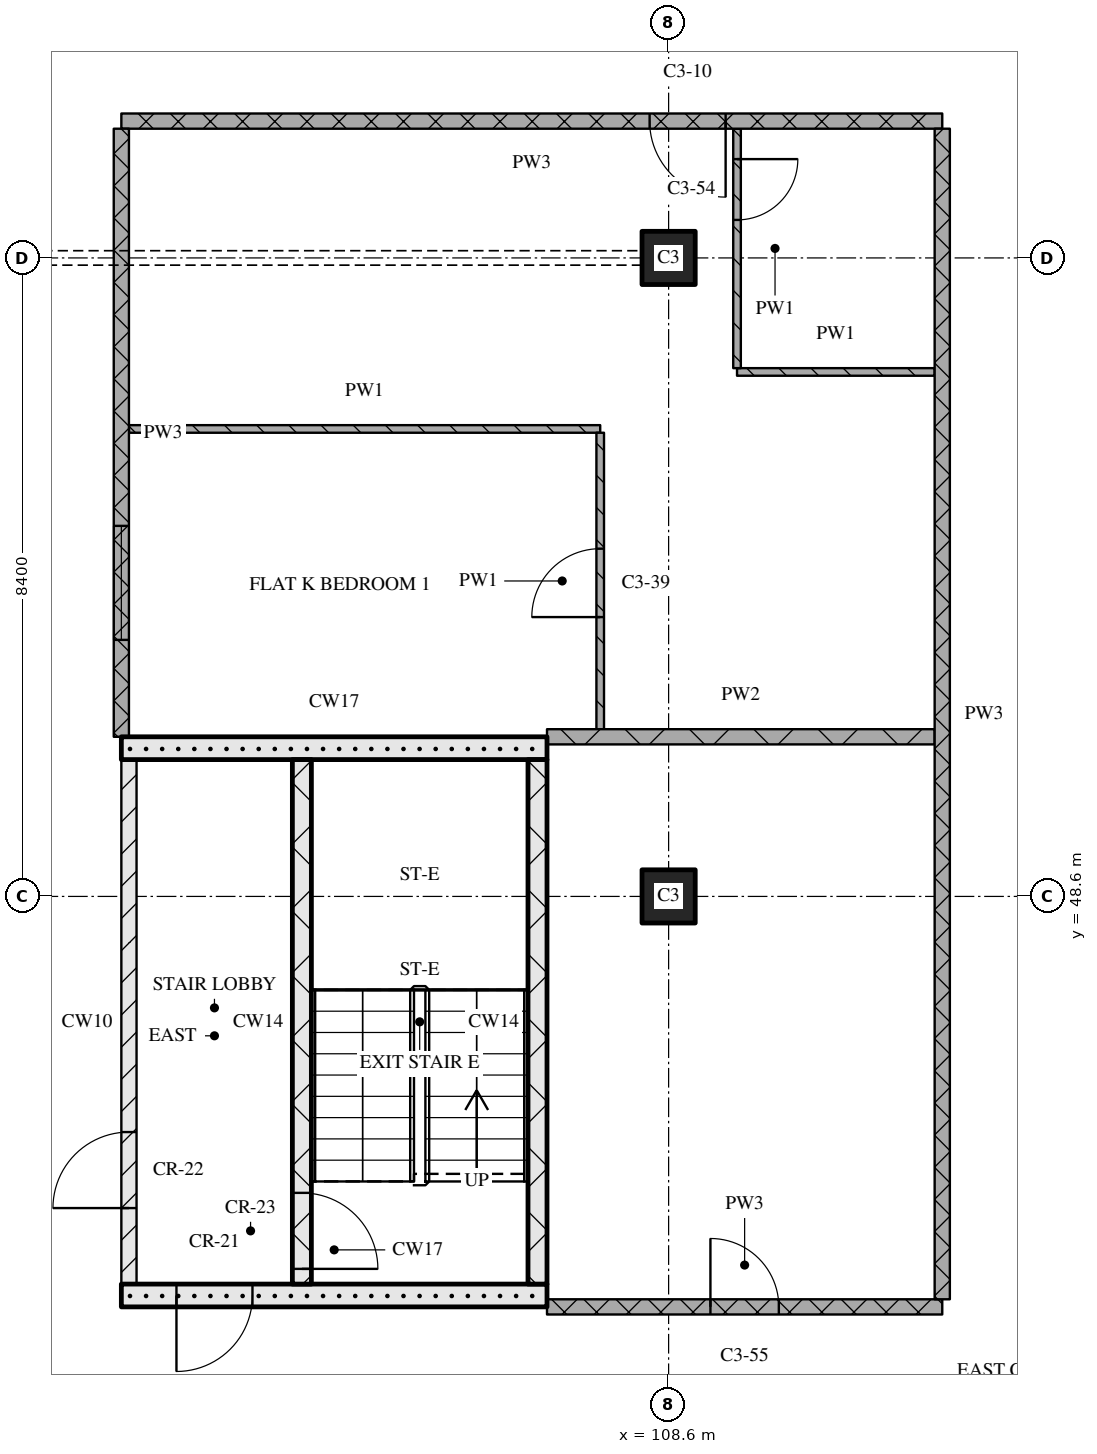
"""IFC4 building model, lengths in metres.
Left out: names, types, materials, properties, quantities, classifications, styles, units other than length and angle.
Written with IfcOpenShell. Run it as: python <this file> out.ifc"""

import sys

from ifc_helpers import new_model, si_unit, direction, frame, frame_2d, origin, origin_2d, place, context, subcontext, project, spatial, rectangle, extrude, element, fill, save


model = new_model("IFC4")
c1 = context("Model", 3, precision=1e-05, world=origin(), true_north=direction((0.0, 1.0)))
c2 = subcontext(c1, "Body", "Model", "MODEL_VIEW")
j1 = project(units=[si_unit("LENGTHUNIT", "METRE"), si_unit("PLANEANGLEUNIT", "RADIAN")], contexts=[c1])
p1 = place(None, origin())
s1 = spatial("IfcSite", under=j1, at=p1, CompositionType="ELEMENT")
p2 = place(p1, origin())
s2 = spatial("IfcBuilding", under=s1, at=p2, CompositionType="ELEMENT")
p3 = place(p2, frame((0.0, 0.0, 176.25)))
s3 = spatial("IfcBuildingStorey", under=s2, at=p3, CompositionType="ELEMENT", Elevation=176.25)
for number, where, z_axis, x_axis in (
    (1, (108.6, 48.6, 0.0), (0.0, 0.0, 1.0), (1.0, 0.0, 0.0)),
    (2, (108.6, 57.0, 0.0), (0.0, 0.0, 1.0), (1.0, 0.0, 0.0)),
):
    element("IfcColumn", number, at=place(p3, frame(where, z_axis=z_axis, x_axis=x_axis)), inside=s3, PredefinedType="COLUMN", context=c2, shape_type="SweptSolid", body=[
        extrude(rectangle(XDim=0.7, YDim=0.7, at=origin_2d()), origin(), (0.0, 0.0, 1.0), 3.6),
    ])
p4 = place(p3, frame((101.4, 43.35, 0.0), z_axis=(0.0, 0.0, 1.0), x_axis=(1.0, 0.0, 0.0)))
e3 = element("IfcWall", 3, at=p4, inside=s3, PredefinedType="SOLIDWALL", context=c2, shape_type="SweptSolid", body=[
    extrude(rectangle(XDim=5.6, YDim=0.3, at=frame_2d((2.8, 0.0))), origin(), (0.0, 0.0, 1.0), 3.32),
])
p5 = place(p4, frame((0.725, 0.0, 0.0)))
e4 = element("IfcOpeningElement", 4, at=p5, cuts=e3, PredefinedType="OPENING", context=c2, shape_type="SweptSolid", body=[
    extrude(rectangle(XDim=1.0, YDim=2.1, at=frame_2d((0.5, 1.05))), frame((0.0, 0.16, 0.0), z_axis=(0.0, -1.0, 0.0), x_axis=(1.0, 0.0, 0.0)), (0.0, 0.0, 1.0), 0.32),
])
p6 = place(p3, frame((101.5, 43.5, 0.0), z_axis=(0.0, 0.0, 1.0), x_axis=(0.0, 1.0, 0.0)))
e5 = element("IfcWall", 5, at=p6, inside=s3, PredefinedType="PARTITIONING", context=c2, shape_type="SweptSolid", body=[
    extrude(rectangle(XDim=6.9, YDim=0.2, at=frame_2d((3.45, 0.0))), origin(), (0.0, 0.0, 1.0), 3.32),
])
p7 = place(p6, frame((1.0, 0.0, 0.0)))
e6 = element("IfcOpeningElement", 6, at=p7, cuts=e5, PredefinedType="OPENING", context=c2, shape_type="SweptSolid", body=[
    extrude(rectangle(XDim=1.0, YDim=2.1, at=frame_2d((0.5, 1.05))), frame((0.0, 0.11, 0.0), z_axis=(0.0, -1.0, 0.0), x_axis=(1.0, 0.0, 0.0)), (0.0, 0.0, 1.0), 0.22),
])
p8 = place(p3, frame((103.775, 43.5, 0.0), z_axis=(0.0, 0.0, 1.0), x_axis=(0.0, 1.0, 0.0)))
e7 = element("IfcWall", 7, at=p8, inside=s3, PredefinedType="SOLIDWALL", context=c2, shape_type="SweptSolid", body=[
    extrude(rectangle(XDim=6.9, YDim=0.25, at=frame_2d((3.45, 0.0))), origin(), (0.0, 0.0, 1.0), 3.32),
])
p9 = place(p8, frame((0.2, 0.0, 0.0)))
e8 = element("IfcOpeningElement", 8, at=p9, cuts=e7, PredefinedType="OPENING", context=c2, shape_type="SweptSolid", body=[
    extrude(rectangle(XDim=1.0, YDim=2.1, at=frame_2d((0.5, 1.05))), frame((0.0, 0.135, 0.0), z_axis=(0.0, -1.0, 0.0), x_axis=(1.0, 0.0, 0.0)), (0.0, 0.0, 1.0), 0.27),
])
p10 = place(p3, frame((106.875, 43.5, 0.0), z_axis=(0.0, 0.0, 1.0), x_axis=(0.0, 1.0, 0.0)))
e9 = element("IfcWall", 9, at=p10, inside=s3, PredefinedType="SOLIDWALL", context=c2, shape_type="SweptSolid", body=[
    extrude(rectangle(XDim=6.9, YDim=0.25, at=frame_2d((3.45, 0.0))), origin(), (0.0, 0.0, 1.0), 3.32),
])
p11 = place(p3, frame((101.4, 50.55, 0.0), z_axis=(0.0, 0.0, 1.0), x_axis=(1.0, 0.0, 0.0)))
e10 = element("IfcWall", 10, at=p11, inside=s3, PredefinedType="SOLIDWALL", context=c2, shape_type="SweptSolid", body=[
    extrude(rectangle(XDim=5.6, YDim=0.3, at=frame_2d((2.8, 0.0))), origin(), (0.0, 0.0, 1.0), 3.32),
])
p12 = place(p3, frame((107.0, 43.2, 0.0), z_axis=(0.0, 0.0, 1.0), x_axis=(1.0, 0.0, 0.0)))
e11 = element("IfcWall", 11, at=p12, inside=s3, PredefinedType="PARTITIONING", context=c2, shape_type="SweptSolid", body=[
    extrude(rectangle(XDim=5.2, YDim=0.2, at=frame_2d((2.6, 0.0))), origin(), (0.0, 0.0, 1.0), 3.32),
])
p13 = place(p12, frame((2.15, 0.0, 0.0)))
e12 = element("IfcOpeningElement", 12, at=p13, cuts=e11, PredefinedType="OPENING", context=c2, shape_type="SweptSolid", body=[
    extrude(rectangle(XDim=0.9, YDim=2.1, at=frame_2d((0.45, 1.05))), frame((0.0, 0.11, 0.0), z_axis=(0.0, -1.0, 0.0), x_axis=(1.0, 0.0, 0.0)), (0.0, 0.0, 1.0), 0.22),
])
p14 = place(p3, frame((107.0, 50.7, 0.0), z_axis=(0.0, 0.0, 1.0), x_axis=(1.0, 0.0, 0.0)))
e13 = element("IfcWall", 13, at=p14, inside=s3, PredefinedType="PARTITIONING", context=c2, shape_type="SweptSolid", body=[
    extrude(rectangle(XDim=5.1, YDim=0.2, at=frame_2d((2.55, 0.0))), origin(), (0.0, 0.0, 1.0), 3.32),
])
p15 = place(p3, frame((101.5, 54.75, 0.0), z_axis=(0.0, 0.0, 1.0), x_axis=(1.0, 0.0, 0.0)))
e14 = element("IfcWall", 14, at=p15, inside=s3, PredefinedType="PARTITIONING", context=c2, shape_type="SweptSolid", body=[
    extrude(rectangle(XDim=6.2, YDim=0.1, at=frame_2d((3.1, 0.0))), origin(), (0.0, 0.0, 1.0), 3.32),
])
p16 = place(p3, frame((109.5, 55.5, 0.0), z_axis=(0.0, 0.0, 1.0), x_axis=(1.0, 0.0, 0.0)))
e15 = element("IfcWall", 15, at=p16, inside=s3, PredefinedType="PARTITIONING", context=c2, shape_type="SweptSolid", body=[
    extrude(rectangle(XDim=2.6, YDim=0.1, at=frame_2d((1.3, 0.0))), origin(), (0.0, 0.0, 1.0), 3.32),
])
p17 = place(p3, frame((112.2, 58.8, 0.0), z_axis=(0.0, 0.0, 1.0), x_axis=(-1.0, 0.0, 0.0)))
e16 = element("IfcWall", 16, at=p17, inside=s3, PredefinedType="PARTITIONING", context=c2, shape_type="SweptSolid", body=[
    extrude(rectangle(XDim=10.8, YDim=0.2, at=frame_2d((5.4, 0.0))), origin(), (0.0, 0.0, 1.0), 3.32),
])
p18 = place(p17, frame((2.85, 0.0, 0.0)))
e17 = element("IfcOpeningElement", 17, at=p18, cuts=e16, PredefinedType="OPENING", context=c2, shape_type="SweptSolid", body=[
    extrude(rectangle(XDim=1.0, YDim=2.1, at=frame_2d((0.5, 1.05))), frame((0.0, 0.11, 0.0), z_axis=(0.0, -1.0, 0.0), x_axis=(1.0, 0.0, 0.0)), (0.0, 0.0, 1.0), 0.22),
])
p19 = place(p3, frame((101.4, 58.7, 0.0), z_axis=(0.0, 0.0, 1.0), x_axis=(0.0, -1.0, 0.0)))
e18 = element("IfcWall", 18, at=p19, inside=s3, PredefinedType="PARTITIONING", context=c2, shape_type="SweptSolid", body=[
    extrude(rectangle(XDim=8.0, YDim=0.2, at=frame_2d((4.0, 0.0))), origin(), (0.0, 0.0, 1.0), 3.32),
])
p20 = place(p19, frame((5.225, 0.0, 0.9)))
e19 = element("IfcOpeningElement", 19, at=p20, cuts=e18, PredefinedType="OPENING", context=c2, shape_type="SweptSolid", body=[
    extrude(rectangle(XDim=1.5, YDim=1.5, at=frame_2d((0.75, 0.75))), frame((0.0, 0.11, 0.0), z_axis=(0.0, -1.0, 0.0), x_axis=(1.0, 0.0, 0.0)), (0.0, 0.0, 1.0), 0.22),
])
p21 = place(p3, frame((107.7, 50.8, 0.0), z_axis=(0.0, 0.0, 1.0), x_axis=(0.0, 1.0, 0.0)))
e20 = element("IfcWall", 20, at=p21, inside=s3, PredefinedType="PARTITIONING", context=c2, shape_type="SweptSolid", body=[
    extrude(rectangle(XDim=3.9, YDim=0.1, at=frame_2d((1.95, 0.0))), origin(), (0.0, 0.0, 1.0), 3.32),
])
p22 = place(p21, frame((1.475, 0.0, 0.0)))
e21 = element("IfcOpeningElement", 21, at=p22, cuts=e20, PredefinedType="OPENING", context=c2, shape_type="SweptSolid", body=[
    extrude(rectangle(XDim=0.9, YDim=2.1, at=frame_2d((0.45, 1.05))), frame((0.0, 0.06, 0.0), z_axis=(0.0, -1.0, 0.0), x_axis=(1.0, 0.0, 0.0)), (0.0, 0.0, 1.0), 0.12),
])
p23 = place(p3, frame((109.5, 58.7, 0.0), z_axis=(0.0, 0.0, 1.0), x_axis=(0.0, -1.0, 0.0)))
e22 = element("IfcWall", 22, at=p23, inside=s3, PredefinedType="PARTITIONING", context=c2, shape_type="SweptSolid", body=[
    extrude(rectangle(XDim=3.15, YDim=0.1, at=frame_2d((1.575, 0.0))), origin(), (0.0, 0.0, 1.0), 3.32),
])
p24 = place(p23, frame((0.4, 0.0, 0.0)))
e23 = element("IfcOpeningElement", 23, at=p24, cuts=e22, PredefinedType="OPENING", context=c2, shape_type="SweptSolid", body=[
    extrude(rectangle(XDim=0.8, YDim=2.1, at=frame_2d((0.4, 1.05))), frame((0.0, 0.06, 0.0), z_axis=(0.0, -1.0, 0.0), x_axis=(1.0, 0.0, 0.0)), (0.0, 0.0, 1.0), 0.12),
])
p25 = place(p3, frame((112.2, 58.7, 0.0), z_axis=(0.0, 0.0, 1.0), x_axis=(0.0, -1.0, 0.0)))
e24 = element("IfcWall", 24, at=p25, inside=s3, PredefinedType="PARTITIONING", context=c2, shape_type="SweptSolid", body=[
    extrude(rectangle(XDim=15.4, YDim=0.2, at=frame_2d((7.7, 0.0))), origin(), (0.0, 0.0, 1.0), 3.32),
])
p26 = place(p5, origin())
e25 = element("IfcDoor", 25, at=p26, inside=s3, OperationType="SINGLE_SWING_RIGHT", PredefinedType="DOOR", context=c2, shape_type="SweptSolid", body=[
    extrude(rectangle(XDim=1.0, YDim=2.1, at=frame_2d((0.5, 1.05))), frame((0.0, 0.025, 0.0), z_axis=(0.0, -1.0, 0.0), x_axis=(1.0, 0.0, 0.0)), (0.0, 0.0, 1.0), 0.05),
])
fill(e4, e25)
p27 = place(p9, origin())
e26 = element("IfcDoor", 26, at=p27, inside=s3, OperationType="SINGLE_SWING_RIGHT", PredefinedType="DOOR", context=c2, shape_type="SweptSolid", body=[
    extrude(rectangle(XDim=1.0, YDim=2.1, at=frame_2d((0.5, 1.05))), frame((0.0, 0.025, 0.0), z_axis=(0.0, -1.0, 0.0), x_axis=(1.0, 0.0, 0.0)), (0.0, 0.0, 1.0), 0.05),
])
fill(e8, e26)
p28 = place(p7, origin())
e27 = element("IfcDoor", 27, at=p28, inside=s3, OperationType="SINGLE_SWING_LEFT", PredefinedType="DOOR", context=c2, shape_type="SweptSolid", body=[
    extrude(rectangle(XDim=1.0, YDim=2.1, at=frame_2d((0.5, 1.05))), frame((0.0, 0.025, 0.0), z_axis=(0.0, -1.0, 0.0), x_axis=(1.0, 0.0, 0.0)), (0.0, 0.0, 1.0), 0.05),
])
fill(e6, e27)
p29 = place(p13, origin())
e28 = element("IfcDoor", 28, at=p29, inside=s3, OperationType="SINGLE_SWING_LEFT", PredefinedType="DOOR", context=c2, shape_type="SweptSolid", body=[
    extrude(rectangle(XDim=0.9, YDim=2.1, at=frame_2d((0.45, 1.05))), frame((0.0, 0.025, 0.0), z_axis=(0.0, -1.0, 0.0), x_axis=(1.0, 0.0, 0.0)), (0.0, 0.0, 1.0), 0.05),
])
fill(e12, e28)
p30 = place(p18, origin())
e29 = element("IfcDoor", 29, at=p30, inside=s3, OperationType="SINGLE_SWING_LEFT", PredefinedType="DOOR", context=c2, shape_type="SweptSolid", body=[
    extrude(rectangle(XDim=1.0, YDim=2.1, at=frame_2d((0.5, 1.05))), frame((0.0, 0.025, 0.0), z_axis=(0.0, -1.0, 0.0), x_axis=(1.0, 0.0, 0.0)), (0.0, 0.0, 1.0), 0.05),
])
fill(e17, e29)
p31 = place(p22, origin())
e30 = element("IfcDoor", 30, at=p31, inside=s3, OperationType="SINGLE_SWING_LEFT", PredefinedType="DOOR", context=c2, shape_type="SweptSolid", body=[
    extrude(rectangle(XDim=0.9, YDim=2.1, at=frame_2d((0.45, 1.05))), frame((0.0, 0.025, 0.0), z_axis=(0.0, -1.0, 0.0), x_axis=(1.0, 0.0, 0.0)), (0.0, 0.0, 1.0), 0.05),
])
fill(e21, e30)
p32 = place(p24, origin())
e31 = element("IfcDoor", 31, at=p32, inside=s3, OperationType="SINGLE_SWING_LEFT", PredefinedType="DOOR", context=c2, shape_type="SweptSolid", body=[
    extrude(rectangle(XDim=0.8, YDim=2.1, at=frame_2d((0.4, 1.05))), frame((0.0, 0.025, 0.0), z_axis=(0.0, -1.0, 0.0), x_axis=(1.0, 0.0, 0.0)), (0.0, 0.0, 1.0), 0.05),
])
fill(e23, e31)
p33 = place(p20, origin())
e32 = element("IfcWindow", 32, at=p33, inside=s3, PartitioningType="SINGLE_PANEL", PredefinedType="WINDOW", context=c2, shape_type="SweptSolid", body=[
    extrude(rectangle(XDim=1.5, YDim=1.5, at=frame_2d((0.75, 0.75))), frame((0.0, 0.03, 0.0), z_axis=(0.0, -1.0, 0.0), x_axis=(1.0, 0.0, 0.0)), (0.0, 0.0, 1.0), 0.06),
])
fill(e19, e32)
save(model, sys.argv[1])
